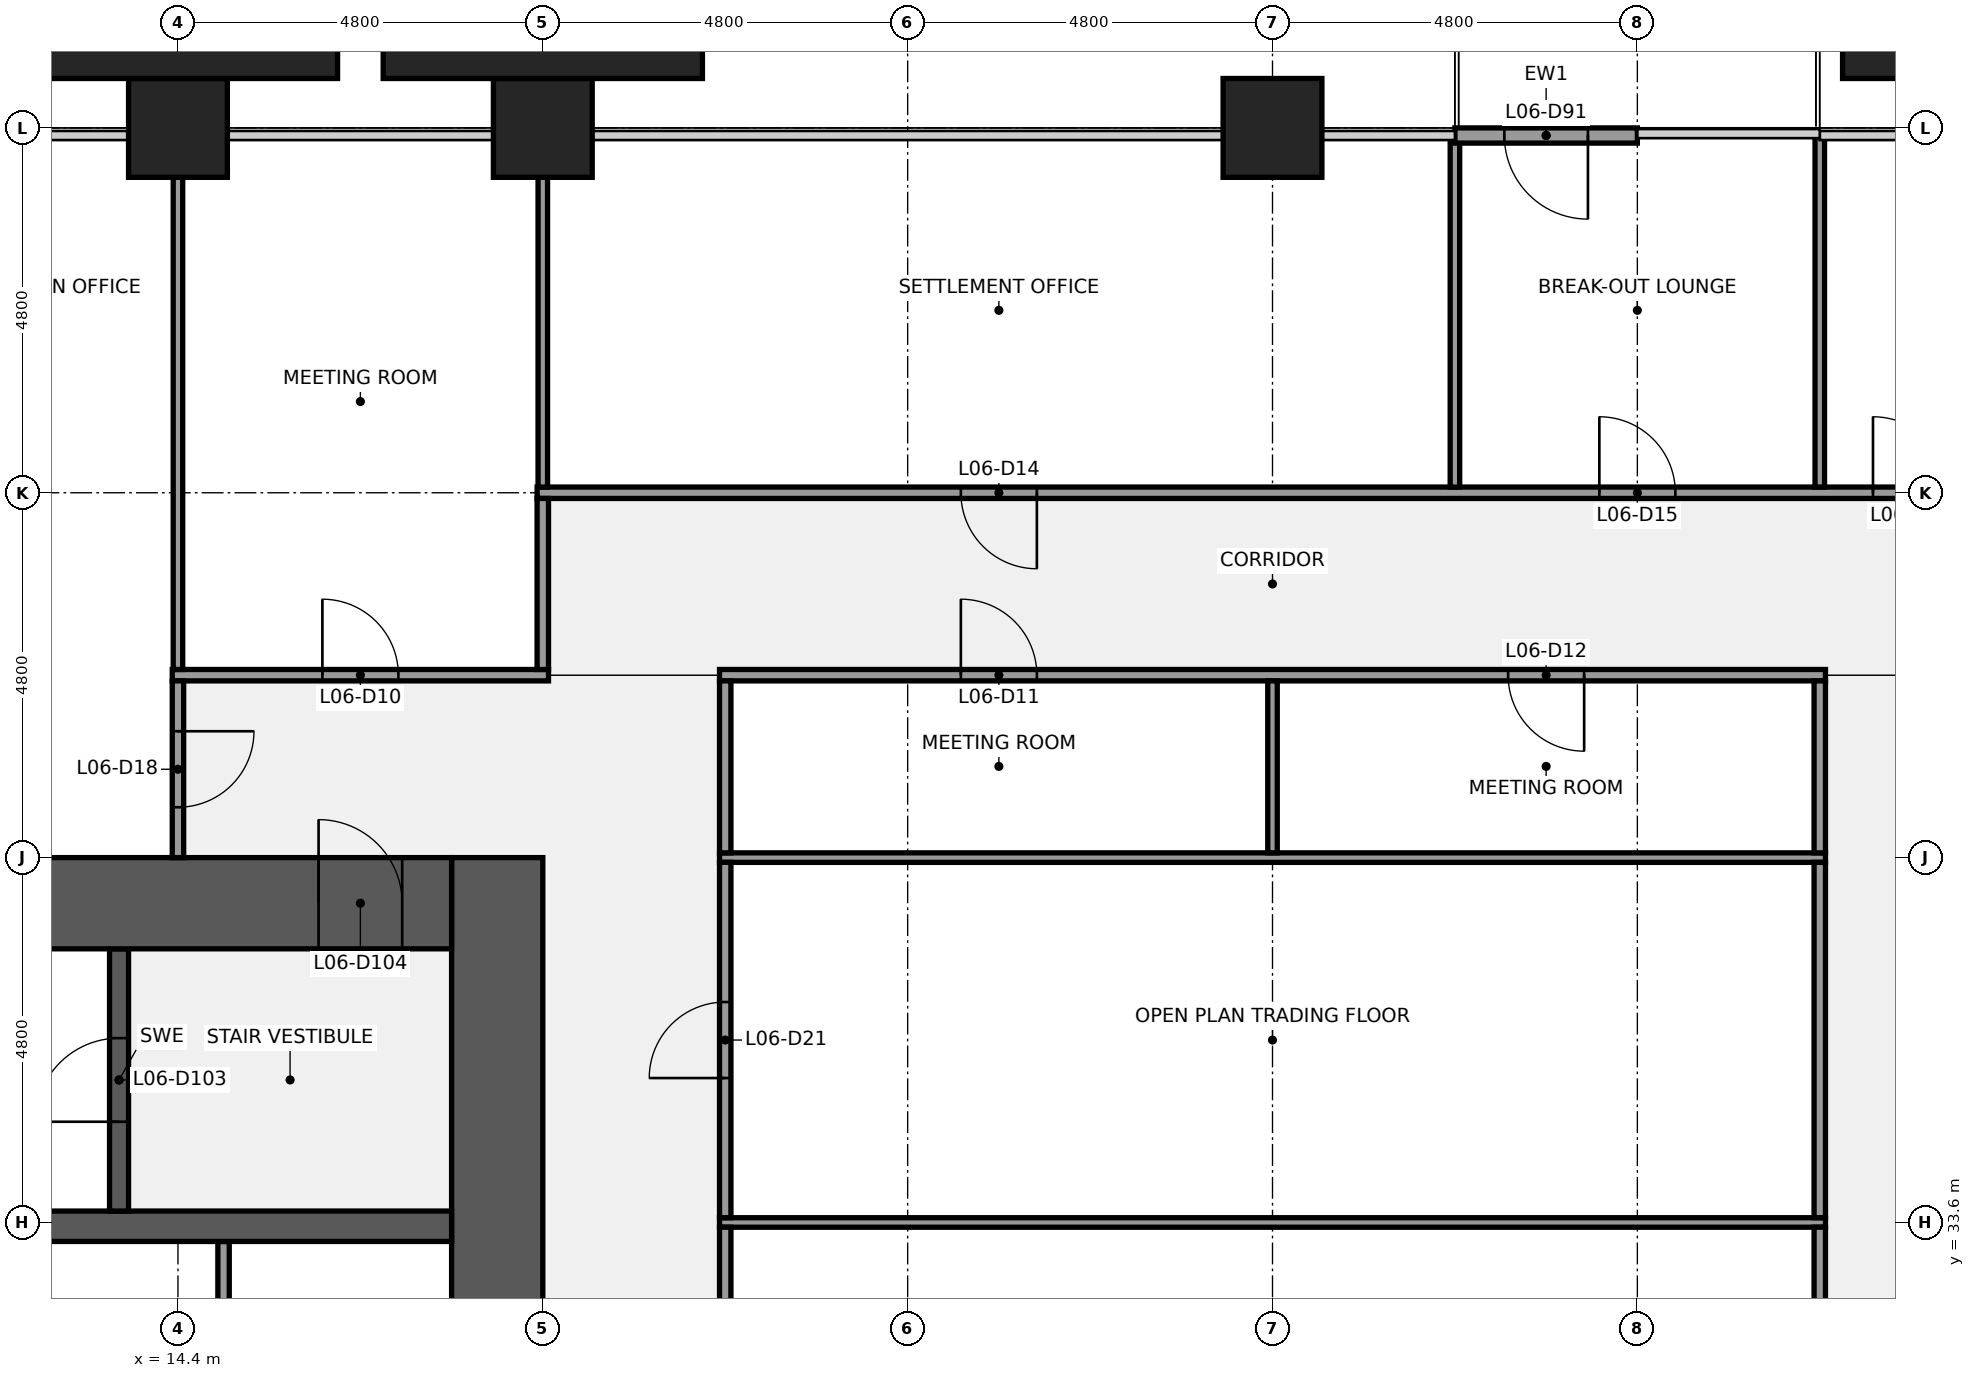
"""IFC4 building model, lengths in metres.
Left out: names, types, materials, properties, quantities, classifications, styles, units other than length and angle.
Written with IfcOpenShell. Run it as: python <this file> out.ifc"""

import sys

from ifc_helpers import new_model, si_unit, direction, frame, frame_2d, origin, origin_2d, place, context, subcontext, project, spatial, rectangle, extrude, element, fill, save


model = new_model("IFC4")
c1 = context("Model", 3, precision=1e-05, world=origin(), true_north=direction((0.0, 1.0)))
c2 = subcontext(c1, "Body", "Model", "MODEL_VIEW")
j1 = project(units=[si_unit("LENGTHUNIT", "METRE"), si_unit("PLANEANGLEUNIT", "RADIAN")], contexts=[c1])
p1 = place(None, origin())
s1 = spatial("IfcSite", under=j1, at=p1, CompositionType="ELEMENT")
p2 = place(p1, origin())
s2 = spatial("IfcBuilding", under=s1, at=p2, CompositionType="ELEMENT")
p3 = place(p2, frame((0.0, 0.0, 34.6)))
s3 = spatial("IfcBuildingStorey", under=s2, at=p3, CompositionType="ELEMENT", Elevation=34.6)
for number, where, z_axis, x_axis in (
    (1, (14.4, 48.0, 0.0), (0.0, 0.0, 1.0), (1.0, 0.0, 0.0)),
    (2, (19.2, 48.0, 0.0), (0.0, 0.0, 1.0), (1.0, 0.0, 0.0)),
    (3, (28.8, 48.0, 0.0), (0.0, 0.0, 1.0), (1.0, 0.0, 0.0)),
):
    element("IfcColumn", number, at=place(p3, frame(where, z_axis=z_axis, x_axis=x_axis)), inside=s3, PredefinedType="COLUMN", context=c2, shape_type="SweptSolid", body=[
        extrude(rectangle(XDim=1.3, YDim=1.3, at=origin_2d()), origin(), (0.0, 0.0, 1.0), 4.4),
    ])
p4 = place(p3, frame((18.6, 38.4, 0.0), z_axis=(0.0, 0.0, 1.0), x_axis=(0.0, -1.0, 0.0)))
e4 = element("IfcWall", 4, at=p4, inside=s3, PredefinedType="SHEAR", context=c2, shape_type="SweptSolid", body=[
    extrude(rectangle(XDim=28.8, YDim=1.2, at=frame_2d((14.4, 0.0))), origin(), (0.0, 0.0, 1.0), 4.24),
])
p5 = place(p4, frame((18.3, 0.0, 0.0)))
e5 = element("IfcOpeningElement", 5, at=p5, cuts=e4, PredefinedType="OPENING", context=c2, shape_type="SweptSolid", body=[
    extrude(rectangle(XDim=1.8, YDim=2.1, at=frame_2d((0.9, 1.05))), frame((0.0, 0.61, 0.0), z_axis=(0.0, -1.0, 0.0), x_axis=(1.0, 0.0, 0.0)), (0.0, 0.0, 1.0), 1.22),
])
p6 = place(p4, frame((8.7, 0.0, 0.0)))
e6 = element("IfcOpeningElement", 6, at=p6, cuts=e4, PredefinedType="OPENING", context=c2, shape_type="SweptSolid", body=[
    extrude(rectangle(XDim=1.8, YDim=2.1, at=frame_2d((0.9, 1.05))), frame((0.0, 0.61, 0.0), z_axis=(0.0, -1.0, 0.0), x_axis=(1.0, 0.0, 0.0)), (0.0, 0.0, 1.0), 1.22),
])
p7 = place(p3, frame((15.0, 30.75, 0.0), z_axis=(0.0, 0.0, 1.0), x_axis=(0.0, 1.0, 0.0)))
e7 = element("IfcWall", 7, at=p7, inside=s3, PredefinedType="PARTITIONING", context=c2, shape_type="SweptSolid", body=[
    extrude(rectangle(XDim=2.6, YDim=0.15, at=frame_2d((1.3, 0.0))), origin(), (0.0, 0.0, 1.0), 4.24),
])
p8 = place(p3, frame((1.2, 33.55, 0.0), z_axis=(0.0, 0.0, 1.0), x_axis=(1.0, 0.0, 0.0)))
e8 = element("IfcWall", 8, at=p8, inside=s3, PredefinedType="SHEAR", context=c2, shape_type="SweptSolid", body=[
    extrude(rectangle(XDim=16.8, YDim=0.4, at=frame_2d((8.4, 0.0))), origin(), (0.0, 0.0, 1.0), 4.24),
])
p9 = place(p3, frame((13.625, 33.75, 0.0), z_axis=(0.0, 0.0, 1.0), x_axis=(0.0, 1.0, 0.0)))
e9 = element("IfcWall", 9, at=p9, inside=s3, PredefinedType="SHEAR", context=c2, shape_type="SweptSolid", body=[
    extrude(rectangle(XDim=3.45, YDim=0.25, at=frame_2d((1.725, 0.0))), origin(), (0.0, 0.0, 1.0), 4.24),
])
p10 = place(p9, frame((1.175, 0.0, 0.0)))
e10 = element("IfcOpeningElement", 10, at=p10, cuts=e9, PredefinedType="OPENING", context=c2, shape_type="SweptSolid", body=[
    extrude(rectangle(XDim=1.1, YDim=2.1, at=frame_2d((0.55, 1.05))), frame((0.0, 0.135, 0.0), z_axis=(0.0, -1.0, 0.0), x_axis=(1.0, 0.0, 0.0)), (0.0, 0.0, 1.0), 0.27),
])
p11 = place(p3, frame((4.8, 37.8, 0.0), z_axis=(0.0, 0.0, 1.0), x_axis=(1.0, 0.0, 0.0)))
e11 = element("IfcWall", 11, at=p11, inside=s3, PredefinedType="SHEAR", context=c2, shape_type="SweptSolid", body=[
    extrude(rectangle(XDim=13.2, YDim=1.2, at=frame_2d((6.6, 0.0))), origin(), (0.0, 0.0, 1.0), 4.24),
])
p12 = place(p11, frame((11.45, 0.0, 0.0)))
e12 = element("IfcOpeningElement", 12, at=p12, cuts=e11, PredefinedType="OPENING", context=c2, shape_type="SweptSolid", body=[
    extrude(rectangle(XDim=1.1, YDim=2.1, at=frame_2d((0.55, 1.05))), frame((0.0, 0.61, 0.0), z_axis=(0.0, -1.0, 0.0), x_axis=(1.0, 0.0, 0.0)), (0.0, 0.0, 1.0), 1.22),
])
for number, where, z_axis, x_axis in (
    (13, (21.525, 33.6, 0.0), (0.0, 0.0, 1.0), (1.0, 0.0, 0.0)),
    (14, (21.525, 38.4, 0.0), (0.0, 0.0, 1.0), (1.0, 0.0, 0.0)),
):
    element("IfcWall", number, at=place(p3, frame(where, z_axis=z_axis, x_axis=x_axis)), inside=s3, PredefinedType="PARTITIONING", context=c2, shape_type="SweptSolid", body=[
        extrude(rectangle(XDim=14.55, YDim=0.125, at=frame_2d((7.275, 0.0))), origin(), (0.0, 0.0, 1.0), 3.27),
    ])
p13 = place(p3, frame((14.325, 40.8, 0.0), z_axis=(0.0, 0.0, 1.0), x_axis=(1.0, 0.0, 0.0)))
e15 = element("IfcWall", 15, at=p13, inside=s3, PredefinedType="PARTITIONING", context=c2, shape_type="SweptSolid", body=[
    extrude(rectangle(XDim=4.95, YDim=0.15, at=frame_2d((2.475, 0.0))), origin(), (0.0, 0.0, 1.0), 3.27),
])
p14 = place(p13, frame((1.975, 0.0, 0.0)))
e16 = element("IfcOpeningElement", 16, at=p14, cuts=e15, PredefinedType="OPENING", context=c2, shape_type="SweptSolid", body=[
    extrude(rectangle(XDim=1.0, YDim=2.1, at=frame_2d((0.5, 1.05))), frame((0.0, 0.085, 0.0), z_axis=(0.0, -1.0, 0.0), x_axis=(1.0, 0.0, 0.0)), (0.0, 0.0, 1.0), 0.17),
])
p15 = place(p3, frame((21.525, 40.8, 0.0), z_axis=(0.0, 0.0, 1.0), x_axis=(1.0, 0.0, 0.0)))
e17 = element("IfcWall", 17, at=p15, inside=s3, PredefinedType="PARTITIONING", context=c2, shape_type="SweptSolid", body=[
    extrude(rectangle(XDim=14.55, YDim=0.15, at=frame_2d((7.275, 0.0))), origin(), (0.0, 0.0, 1.0), 3.27),
])
p16 = place(p15, frame((3.175, 0.0, 0.0)))
e18 = element("IfcOpeningElement", 18, at=p16, cuts=e17, PredefinedType="OPENING", context=c2, shape_type="SweptSolid", body=[
    extrude(rectangle(XDim=1.0, YDim=2.1, at=frame_2d((0.5, 1.05))), frame((0.0, 0.085, 0.0), z_axis=(0.0, -1.0, 0.0), x_axis=(1.0, 0.0, 0.0)), (0.0, 0.0, 1.0), 0.17),
])
p17 = place(p15, frame((10.375, 0.0, 0.0)))
e19 = element("IfcOpeningElement", 19, at=p17, cuts=e17, PredefinedType="OPENING", context=c2, shape_type="SweptSolid", body=[
    extrude(rectangle(XDim=1.0, YDim=2.1, at=frame_2d((0.5, 1.05))), frame((0.0, 0.085, 0.0), z_axis=(0.0, -1.0, 0.0), x_axis=(1.0, 0.0, 0.0)), (0.0, 0.0, 1.0), 0.17),
])
p18 = place(p3, frame((19.125, 43.2, 0.0), z_axis=(0.0, 0.0, 1.0), x_axis=(1.0, 0.0, 0.0)))
e20 = element("IfcWall", 20, at=p18, inside=s3, PredefinedType="PARTITIONING", context=c2, shape_type="SweptSolid", body=[
    extrude(rectangle(XDim=19.35, YDim=0.15, at=frame_2d((9.675, 0.0))), origin(), (0.0, 0.0, 1.0), 3.27),
])
p19 = place(p18, frame((5.575, 0.0, 0.0)))
e21 = element("IfcOpeningElement", 21, at=p19, cuts=e20, PredefinedType="OPENING", context=c2, shape_type="SweptSolid", body=[
    extrude(rectangle(XDim=1.0, YDim=2.1, at=frame_2d((0.5, 1.05))), frame((0.0, 0.085, 0.0), z_axis=(0.0, -1.0, 0.0), x_axis=(1.0, 0.0, 0.0)), (0.0, 0.0, 1.0), 0.17),
])
p20 = place(p18, frame((13.975, 0.0, 0.0)))
e22 = element("IfcOpeningElement", 22, at=p20, cuts=e20, PredefinedType="OPENING", context=c2, shape_type="SweptSolid", body=[
    extrude(rectangle(XDim=1.0, YDim=2.1, at=frame_2d((0.5, 1.05))), frame((0.0, 0.085, 0.0), z_axis=(0.0, -1.0, 0.0), x_axis=(1.0, 0.0, 0.0)), (0.0, 0.0, 1.0), 0.17),
])
p21 = place(p18, frame((17.575, 0.0, 0.0)))
e23 = element("IfcOpeningElement", 23, at=p21, cuts=e20, PredefinedType="OPENING", context=c2, shape_type="SweptSolid", body=[
    extrude(rectangle(XDim=1.0, YDim=2.1, at=frame_2d((0.5, 1.05))), frame((0.0, 0.085, 0.0), z_axis=(0.0, -1.0, 0.0), x_axis=(1.0, 0.0, 0.0)), (0.0, 0.0, 1.0), 0.17),
])
p22 = place(p3, frame((14.4, 40.875, 0.0), z_axis=(0.0, 0.0, 1.0), x_axis=(0.0, 1.0, 0.0)))
e24 = element("IfcWall", 24, at=p22, inside=s3, PredefinedType="PARTITIONING", context=c2, shape_type="SweptSolid", body=[
    extrude(rectangle(XDim=6.475, YDim=0.125, at=frame_2d((3.238, 0.0))), origin(), (0.0, 0.0, 1.0), 3.27),
])
p23 = place(p3, frame((14.4, 38.4, 0.0), z_axis=(0.0, 0.0, 1.0), x_axis=(0.0, 1.0, 0.0)))
e25 = element("IfcWall", 25, at=p23, inside=s3, PredefinedType="PARTITIONING", context=c2, shape_type="SweptSolid", body=[
    extrude(rectangle(XDim=2.325, YDim=0.15, at=frame_2d((1.163, 0.0))), origin(), (0.0, 0.0, 1.0), 3.27),
])
p24 = place(p23, frame((0.663, 0.0, 0.0)))
e26 = element("IfcOpeningElement", 26, at=p24, cuts=e25, PredefinedType="OPENING", context=c2, shape_type="SweptSolid", body=[
    extrude(rectangle(XDim=1.0, YDim=2.1, at=frame_2d((0.5, 1.05))), frame((0.0, 0.085, 0.0), z_axis=(0.0, -1.0, 0.0), x_axis=(1.0, 0.0, 0.0)), (0.0, 0.0, 1.0), 0.17),
])
p25 = place(p3, frame((19.2, 43.275, 0.0), z_axis=(0.0, 0.0, 1.0), x_axis=(0.0, 1.0, 0.0)))
e27 = element("IfcWall", 27, at=p25, inside=s3, PredefinedType="PARTITIONING", context=c2, shape_type="SweptSolid", body=[
    extrude(rectangle(XDim=4.075, YDim=0.125, at=frame_2d((2.038, 0.0))), origin(), (0.0, 0.0, 1.0), 3.27),
])
p26 = place(p3, frame((19.2, 40.875, 0.0), z_axis=(0.0, 0.0, 1.0), x_axis=(0.0, 1.0, 0.0)))
e28 = element("IfcWall", 28, at=p26, inside=s3, PredefinedType="PARTITIONING", context=c2, shape_type="SweptSolid", body=[
    extrude(rectangle(XDim=2.25, YDim=0.15, at=frame_2d((1.125, 0.0))), origin(), (0.0, 0.0, 1.0), 3.27),
])
p27 = place(p3, frame((21.6, 24.062, 0.0), z_axis=(0.0, 0.0, 1.0), x_axis=(0.0, 1.0, 0.0)))
e29 = element("IfcWall", 29, at=p27, inside=s3, PredefinedType="PARTITIONING", context=c2, shape_type="SweptSolid", body=[
    extrude(rectangle(XDim=9.475, YDim=0.15, at=frame_2d((4.738, 0.0))), origin(), (0.0, 0.0, 1.0), 3.27),
])
p28 = place(p27, frame((4.238, 0.0, 0.0)))
e30 = element("IfcOpeningElement", 30, at=p28, cuts=e29, PredefinedType="OPENING", context=c2, shape_type="SweptSolid", body=[
    extrude(rectangle(XDim=1.0, YDim=2.1, at=frame_2d((0.5, 1.05))), frame((0.0, 0.085, 0.0), z_axis=(0.0, -1.0, 0.0), x_axis=(1.0, 0.0, 0.0)), (0.0, 0.0, 1.0), 0.17),
])
p29 = place(p3, frame((21.6, 33.663, 0.0), z_axis=(0.0, 0.0, 1.0), x_axis=(0.0, 1.0, 0.0)))
e31 = element("IfcWall", 31, at=p29, inside=s3, PredefinedType="PARTITIONING", context=c2, shape_type="SweptSolid", body=[
    extrude(rectangle(XDim=4.675, YDim=0.15, at=frame_2d((2.337, 0.0))), origin(), (0.0, 0.0, 1.0), 3.27),
])
p30 = place(p29, frame((1.837, 0.0, 0.0)))
e32 = element("IfcOpeningElement", 32, at=p30, cuts=e31, PredefinedType="OPENING", context=c2, shape_type="SweptSolid", body=[
    extrude(rectangle(XDim=1.0, YDim=2.1, at=frame_2d((0.5, 1.05))), frame((0.0, 0.085, 0.0), z_axis=(0.0, -1.0, 0.0), x_axis=(1.0, 0.0, 0.0)), (0.0, 0.0, 1.0), 0.17),
])
p31 = place(p3, frame((21.6, 38.462, 0.0), z_axis=(0.0, 0.0, 1.0), x_axis=(0.0, 1.0, 0.0)))
e33 = element("IfcWall", 33, at=p31, inside=s3, PredefinedType="PARTITIONING", context=c2, shape_type="SweptSolid", body=[
    extrude(rectangle(XDim=2.263, YDim=0.15, at=frame_2d((1.131, 0.0))), origin(), (0.0, 0.0, 1.0), 3.27),
])
p32 = place(p3, frame((28.8, 38.462, 0.0), z_axis=(0.0, 0.0, 1.0), x_axis=(0.0, 1.0, 0.0)))
e34 = element("IfcWall", 34, at=p32, inside=s3, PredefinedType="PARTITIONING", context=c2, shape_type="SweptSolid", body=[
    extrude(rectangle(XDim=2.263, YDim=0.125, at=frame_2d((1.131, 0.0))), origin(), (0.0, 0.0, 1.0), 3.27),
])
for number, where, z_axis, x_axis in (
    (35, (31.2, 43.275, 0.0), (0.0, 0.0, 1.0), (0.0, 1.0, 0.0)),
    (36, (36.0, 43.275, 0.0), (0.0, 0.0, 1.0), (0.0, 1.0, 0.0)),
):
    element("IfcWall", number, at=place(p3, frame(where, z_axis=z_axis, x_axis=x_axis)), inside=s3, PredefinedType="PARTITIONING", context=c2, shape_type="SweptSolid", body=[
        extrude(rectangle(XDim=4.625, YDim=0.125, at=frame_2d((2.312, 0.0))), origin(), (0.0, 0.0, 1.0), 3.27),
    ])
p33 = place(p3, frame((36.0, 24.062, 0.0), z_axis=(0.0, 0.0, 1.0), x_axis=(0.0, 1.0, 0.0)))
e37 = element("IfcWall", 37, at=p33, inside=s3, PredefinedType="PARTITIONING", context=c2, shape_type="SweptSolid", body=[
    extrude(rectangle(XDim=9.475, YDim=0.15, at=frame_2d((4.738, 0.0))), origin(), (0.0, 0.0, 1.0), 3.27),
])
p34 = place(p3, frame((36.0, 33.663, 0.0), z_axis=(0.0, 0.0, 1.0), x_axis=(0.0, 1.0, 0.0)))
e38 = element("IfcWall", 38, at=p34, inside=s3, PredefinedType="PARTITIONING", context=c2, shape_type="SweptSolid", body=[
    extrude(rectangle(XDim=4.675, YDim=0.15, at=frame_2d((2.337, 0.0))), origin(), (0.0, 0.0, 1.0), 3.27),
])
p35 = place(p3, frame((36.0, 38.462, 0.0), z_axis=(0.0, 0.0, 1.0), x_axis=(0.0, 1.0, 0.0)))
e39 = element("IfcWall", 39, at=p35, inside=s3, PredefinedType="PARTITIONING", context=c2, shape_type="SweptSolid", body=[
    extrude(rectangle(XDim=2.263, YDim=0.15, at=frame_2d((1.131, 0.0))), origin(), (0.0, 0.0, 1.0), 3.27),
])
p36 = place(p3, frame((33.6, 47.9, 0.0), z_axis=(0.0, 0.0, 1.0), x_axis=(-1.0, 0.0, 0.0)))
e40 = element("IfcWall", 40, at=p36, inside=s3, PredefinedType="SOLIDWALL", context=c2, shape_type="SweptSolid", body=[
    extrude(rectangle(XDim=2.4, YDim=0.2, at=frame_2d((1.2, 0.0))), origin(), (0.0, 0.0, 1.0), 3.714),
])
p37 = place(p36, frame((0.65, 0.0, 0.0)))
e41 = element("IfcOpeningElement", 41, at=p37, cuts=e40, PredefinedType="OPENING", context=c2, shape_type="SweptSolid", body=[
    extrude(rectangle(XDim=1.1, YDim=2.1, at=frame_2d((0.55, 1.05))), frame((0.0, 0.11, 0.0), z_axis=(0.0, -1.0, 0.0), x_axis=(1.0, 0.0, 0.0)), (0.0, 0.0, 1.0), 0.22),
])
for number, where, z_axis, x_axis in (
    (42, (14.4, 49.075, 0.0), (0.0, 0.0, 1.0), (1.0, 0.0, 0.0)),
    (43, (19.2, 49.075, 0.0), (0.0, 0.0, 1.0), (1.0, 0.0, 0.0)),
    (44, (38.4, 49.075, 0.0), (0.0, 0.0, 1.0), (1.0, 0.0, 0.0)),
):
    element("IfcColumn", number, at=place(p3, frame(where, z_axis=z_axis, x_axis=x_axis)), inside=s3, PredefinedType="PILASTER", context=c2, shape_type="SweptSolid", body=[
        extrude(rectangle(XDim=4.2, YDim=0.85, at=origin_2d()), origin(), (0.0, 0.0, 1.0), 4.4),
    ])
p38 = place(p10, origin())
e45 = element("IfcDoor", 45, at=p38, inside=s3, OperationType="SINGLE_SWING_LEFT", PredefinedType="DOOR", context=c2, shape_type="SweptSolid", body=[
    extrude(rectangle(XDim=1.1, YDim=2.1, at=frame_2d((0.55, 1.05))), frame((0.0, 0.025, 0.0), z_axis=(0.0, -1.0, 0.0), x_axis=(1.0, 0.0, 0.0)), (0.0, 0.0, 1.0), 0.05),
])
fill(e10, e45)
p39 = place(p12, origin())
e46 = element("IfcDoor", 46, at=p39, inside=s3, OperationType="SINGLE_SWING_LEFT", PredefinedType="DOOR", context=c2, shape_type="SweptSolid", body=[
    extrude(rectangle(XDim=1.1, YDim=2.1, at=frame_2d((0.55, 1.05))), frame((0.0, 0.025, 0.0), z_axis=(0.0, -1.0, 0.0), x_axis=(1.0, 0.0, 0.0)), (0.0, 0.0, 1.0), 0.05),
])
fill(e12, e46)
p40 = place(p14, origin())
e47 = element("IfcDoor", 47, at=p40, inside=s3, OperationType="SINGLE_SWING_LEFT", PredefinedType="DOOR", context=c2, shape_type="SweptSolid", body=[
    extrude(rectangle(XDim=1.0, YDim=2.1, at=frame_2d((0.5, 1.05))), frame((0.0, 0.025, 0.0), z_axis=(0.0, -1.0, 0.0), x_axis=(1.0, 0.0, 0.0)), (0.0, 0.0, 1.0), 0.05),
])
fill(e16, e47)
p41 = place(p16, origin())
e48 = element("IfcDoor", 48, at=p41, inside=s3, OperationType="SINGLE_SWING_LEFT", PredefinedType="DOOR", context=c2, shape_type="SweptSolid", body=[
    extrude(rectangle(XDim=1.0, YDim=2.1, at=frame_2d((0.5, 1.05))), frame((0.0, 0.025, 0.0), z_axis=(0.0, -1.0, 0.0), x_axis=(1.0, 0.0, 0.0)), (0.0, 0.0, 1.0), 0.05),
])
fill(e18, e48)
p42 = place(p17, origin())
e49 = element("IfcDoor", 49, at=p42, inside=s3, OperationType="SINGLE_SWING_RIGHT", PredefinedType="DOOR", context=c2, shape_type="SweptSolid", body=[
    extrude(rectangle(XDim=1.0, YDim=2.1, at=frame_2d((0.5, 1.05))), frame((0.0, 0.025, 0.0), z_axis=(0.0, -1.0, 0.0), x_axis=(1.0, 0.0, 0.0)), (0.0, 0.0, 1.0), 0.05),
])
fill(e19, e49)
p43 = place(p19, origin())
e50 = element("IfcDoor", 50, at=p43, inside=s3, OperationType="SINGLE_SWING_RIGHT", PredefinedType="DOOR", context=c2, shape_type="SweptSolid", body=[
    extrude(rectangle(XDim=1.0, YDim=2.1, at=frame_2d((0.5, 1.05))), frame((0.0, 0.025, 0.0), z_axis=(0.0, -1.0, 0.0), x_axis=(1.0, 0.0, 0.0)), (0.0, 0.0, 1.0), 0.05),
])
fill(e21, e50)
p44 = place(p20, origin())
e51 = element("IfcDoor", 51, at=p44, inside=s3, OperationType="SINGLE_SWING_LEFT", PredefinedType="DOOR", context=c2, shape_type="SweptSolid", body=[
    extrude(rectangle(XDim=1.0, YDim=2.1, at=frame_2d((0.5, 1.05))), frame((0.0, 0.025, 0.0), z_axis=(0.0, -1.0, 0.0), x_axis=(1.0, 0.0, 0.0)), (0.0, 0.0, 1.0), 0.05),
])
fill(e22, e51)
p45 = place(p21, origin())
e52 = element("IfcDoor", 52, at=p45, inside=s3, OperationType="SINGLE_SWING_LEFT", PredefinedType="DOOR", context=c2, shape_type="SweptSolid", body=[
    extrude(rectangle(XDim=1.0, YDim=2.1, at=frame_2d((0.5, 1.05))), frame((0.0, 0.025, 0.0), z_axis=(0.0, -1.0, 0.0), x_axis=(1.0, 0.0, 0.0)), (0.0, 0.0, 1.0), 0.05),
])
fill(e23, e52)
p46 = place(p24, origin())
e53 = element("IfcDoor", 53, at=p46, inside=s3, OperationType="SINGLE_SWING_RIGHT", PredefinedType="DOOR", context=c2, shape_type="SweptSolid", body=[
    extrude(rectangle(XDim=1.0, YDim=2.1, at=frame_2d((0.5, 1.05))), frame((0.0, 0.025, 0.0), z_axis=(0.0, -1.0, 0.0), x_axis=(1.0, 0.0, 0.0)), (0.0, 0.0, 1.0), 0.05),
])
fill(e26, e53)
p47 = place(p30, origin())
e54 = element("IfcDoor", 54, at=p47, inside=s3, OperationType="SINGLE_SWING_LEFT", PredefinedType="DOOR", context=c2, shape_type="SweptSolid", body=[
    extrude(rectangle(XDim=1.0, YDim=2.1, at=frame_2d((0.5, 1.05))), frame((0.0, 0.025, 0.0), z_axis=(0.0, -1.0, 0.0), x_axis=(1.0, 0.0, 0.0)), (0.0, 0.0, 1.0), 0.05),
])
fill(e32, e54)
p48 = place(p37, origin())
e55 = element("IfcDoor", 55, at=p48, inside=s3, OperationType="SINGLE_SWING_LEFT", PredefinedType="DOOR", context=c2, shape_type="SweptSolid", body=[
    extrude(rectangle(XDim=1.1, YDim=2.1, at=frame_2d((0.55, 1.05))), frame((0.0, 0.025, 0.0), z_axis=(0.0, -1.0, 0.0), x_axis=(1.0, 0.0, 0.0)), (0.0, 0.0, 1.0), 0.05),
])
fill(e41, e55)
save(model, sys.argv[1])
